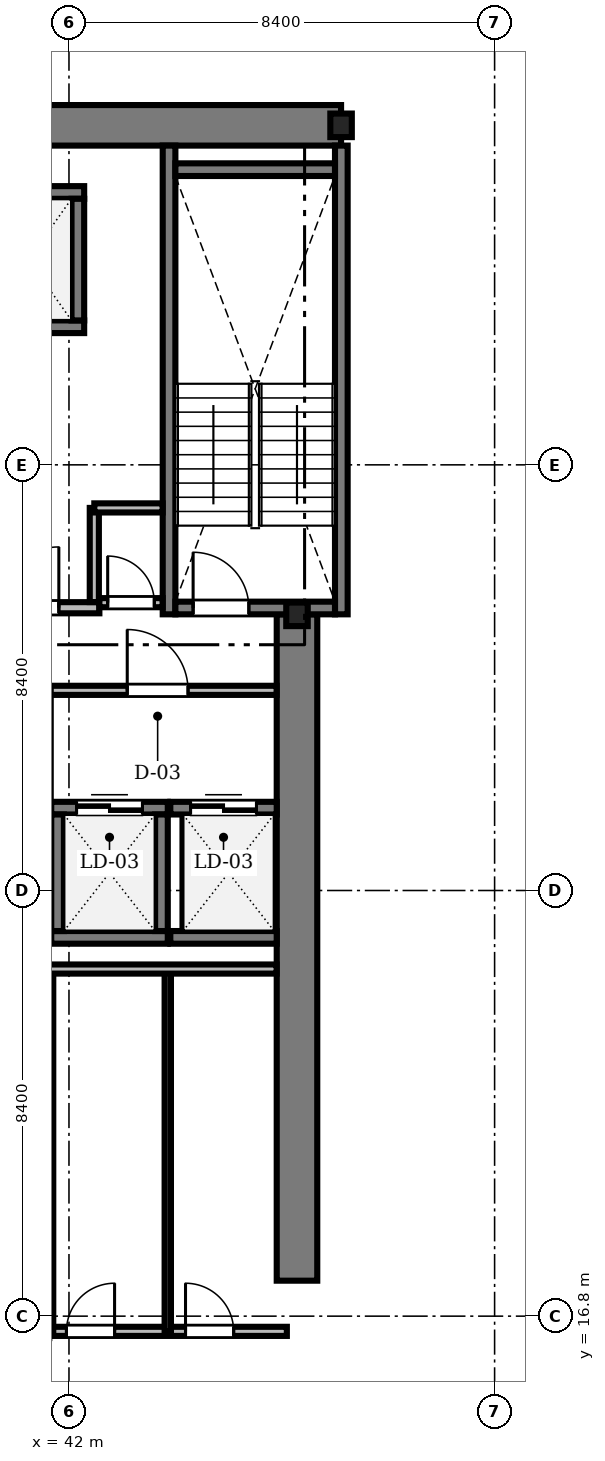
"""IFC4 building model, lengths in metres.
Left out: names, types, materials, properties, quantities, classifications, styles, units other than length and angle.
Written with IfcOpenShell. Run it as: python <this file> out.ifc"""

import sys

from ifc_helpers import new_model, si_unit, direction, frame, frame_2d, origin, origin_2d, place, context, subcontext, project, spatial, rectangle, i_section, extrude, source, transform, mapped, element, fill, save


model = new_model("IFC4")
c1 = context("Model", 3, precision=1e-05, world=origin(), true_north=direction((0.0, 1.0)))
c2 = subcontext(c1, "Body", "Model", "MODEL_VIEW")
j1 = project(units=[si_unit("LENGTHUNIT", "METRE"), si_unit("PLANEANGLEUNIT", "RADIAN")], contexts=[c1])
p1 = place(None, origin())
s1 = spatial("IfcSite", under=j1, at=p1, CompositionType="ELEMENT")
p2 = place(p1, origin())
s2 = spatial("IfcBuilding", under=s1, at=p2, CompositionType="ELEMENT")
p3 = place(p2, frame((0.0, 0.0, 115.0)))
s3 = spatial("IfcBuildingStorey", under=s2, at=p3, CompositionType="ELEMENT", Elevation=115.0)
m1 = source(origin(), c2, "Body", "SweptSolid", [
    extrude(rectangle(XDim=17.52, YDim=0.8, at=frame_2d((8.76, 0.0))), origin(), (0.0, 0.0, 1.0), 3.46),
])
p4 = place(p3, frame((29.85, 40.3, 0.0), z_axis=(0.0, 0.0, 1.0), x_axis=(1.0, 0.0, 0.0)))
e1 = element("IfcWall", 1, at=p4, inside=s3, PredefinedType="SHEAR", context=c2, shape_type="MappedRepresentation", body=[
    mapped(m1, transform((0.0, 0.0, 0.0), scale=1.0)),
])
m2 = source(origin(), c2, "Body", "SweptSolid", [
    extrude(rectangle(XDim=13.15, YDim=0.8, at=frame_2d((6.575, 0.0))), origin(), (0.0, 0.0, 1.0), 3.46),
])
p5 = place(p3, frame((46.5, 17.5, 0.0), z_axis=(0.0, 0.0, 1.0), x_axis=(0.0, 1.0, 0.0)))
e2 = element("IfcWall", 2, at=p5, inside=s3, PredefinedType="SHEAR", context=c2, shape_type="MappedRepresentation", body=[
    mapped(m2, transform((0.0, 0.0, 0.0), scale=1.0)),
])
m3 = source(origin(), c2, "Body", "SweptSolid", [
    extrude(i_section(OverallWidth=0.424, OverallDepth=0.465, WebThickness=0.035, FlangeThickness=0.056, FilletRadius=0.015, at=origin_2d()), origin(), (0.0, 0.0, 1.0), 3.46),
])
for number, where, z_axis, x_axis in (
    (3, (46.5, 30.65, 0.0), (0.0, 0.0, 1.0), (1.0, 0.0, 0.0)),
    (4, (47.37, 40.3, 0.0), (0.0, 0.0, 1.0), (1.0, 0.0, 0.0)),
):
    element("IfcColumn", number, at=place(p3, frame(where, z_axis=z_axis, x_axis=x_axis)), inside=s3, PredefinedType="COLUMN", context=c2, shape_type="MappedRepresentation", body=[
        mapped(m3, transform((0.0, 0.0, 0.0), scale=1.0)),
    ])
m4 = source(origin(), c2, "Body", "SweptSolid", [
    extrude(rectangle(XDim=9.25, YDim=0.25, at=frame_2d((4.625, 0.0))), origin(), (0.0, 0.0, 1.0), 3.5),
])
for number, where, z_axis, x_axis in (
    (5, (43.975, 30.65, 0.0), (0.0, 0.0, 1.0), (0.0, 1.0, 0.0)),
    (6, (47.375, 30.65, 0.0), (0.0, 0.0, 1.0), (0.0, 1.0, 0.0)),
):
    element("IfcWall", number, at=place(p3, frame(where, z_axis=z_axis, x_axis=x_axis)), inside=s3, PredefinedType="SOLIDWALL", context=c2, shape_type="MappedRepresentation", body=[
        mapped(m4, transform((0.0, 0.0, 0.0), scale=1.0)),
    ])
m5 = source(origin(), c2, "Body", "SweptSolid", [
    extrude(rectangle(XDim=3.15, YDim=0.25, at=frame_2d((1.575, 0.0))), origin(), (0.0, 0.0, 1.0), 3.5),
])
p6 = place(p3, frame((44.1, 39.425, 0.0), z_axis=(0.0, 0.0, 1.0), x_axis=(1.0, 0.0, 0.0)))
e7 = element("IfcWall", 7, at=p6, inside=s3, PredefinedType="SOLIDWALL", context=c2, shape_type="MappedRepresentation", body=[
    mapped(m5, transform((0.0, 0.0, 0.0), scale=1.0)),
])
p7 = place(p3, frame((44.1, 30.775, 0.0), z_axis=(0.0, 0.0, 1.0), x_axis=(1.0, 0.0, 0.0)))
e8 = element("IfcWall", 8, at=p7, inside=s3, PredefinedType="SOLIDWALL", context=c2, shape_type="MappedRepresentation", body=[
    mapped(m5, transform((0.0, 0.0, 0.0), scale=1.0)),
])
m6 = source(origin(), c2, "Body", "SweptSolid", [
    extrude(rectangle(XDim=1.1, YDim=2.2, at=frame_2d((0.55, 1.1))), frame((0.0, 0.135, 0.0), z_axis=(0.0, -1.0, 0.0), x_axis=(1.0, 0.0, 0.0)), (0.0, 0.0, 1.0), 0.27),
])
p8 = place(p7, frame((0.35, 0.0, 0.0)))
e9 = element("IfcOpeningElement", 9, at=p8, cuts=e8, PredefinedType="OPENING", context=c2, shape_type="MappedRepresentation", body=[
    mapped(m6, transform((0.0, 0.0, 0.0), scale=1.0)),
])
m7 = source(origin(), c2, "Body", "SweptSolid", [
    extrude(rectangle(XDim=2.8, YDim=0.22, at=frame_2d((1.4, 0.0))), origin(), (0.0, 0.0, 1.0), 3.46),
])
p9 = place(p3, frame((39.8, 30.78, 0.0), z_axis=(0.0, 0.0, 1.0), x_axis=(1.0, 0.0, 0.0)))
e10 = element("IfcWall", 10, at=p9, inside=s3, PredefinedType="SOLIDWALL", context=c2, shape_type="MappedRepresentation", body=[
    mapped(m7, transform((0.0, 0.0, 0.0), scale=1.0)),
])
m8 = source(origin(), c2, "Body", "SweptSolid", [
    extrude(rectangle(XDim=1.2, YDim=2.2, at=frame_2d((0.6, 1.1))), frame((0.0, 0.12, 0.0), z_axis=(0.0, -1.0, 0.0), x_axis=(1.0, 0.0, 0.0)), (0.0, 0.0, 1.0), 0.24),
])
p10 = place(p9, frame((0.8, 0.0, 0.0)))
e11 = element("IfcOpeningElement", 11, at=p10, cuts=e10, PredefinedType="OPENING", context=c2, shape_type="MappedRepresentation", body=[
    mapped(m8, transform((0.0, 0.0, 0.0), scale=1.0)),
])
m9 = source(origin(), c2, "Body", "SweptSolid", [
    extrude(rectangle(XDim=2.55, YDim=0.25, at=frame_2d((1.275, 0.0))), origin(), (0.0, 0.0, 1.0), 3.46),
])
p11 = place(p3, frame((39.75, 36.325, 0.0), z_axis=(0.0, 0.0, 1.0), x_axis=(1.0, 0.0, 0.0)))
e12 = element("IfcWall", 12, at=p11, inside=s3, PredefinedType="SOLIDWALL", context=c2, shape_type="MappedRepresentation", body=[
    mapped(m9, transform((0.0, 0.0, 0.0), scale=1.0)),
])
m10 = source(origin(), c2, "Body", "SweptSolid", [
    extrude(rectangle(XDim=1.2, YDim=2.25, at=frame_2d((0.6, 1.125))), frame((0.0, 0.135, 0.0), z_axis=(0.0, -1.0, 0.0), x_axis=(1.0, 0.0, 0.0)), (0.0, 0.0, 1.0), 0.27),
])
p12 = place(p11, frame((0.675, 0.0, 0.0)))
e13 = element("IfcOpeningElement", 13, at=p12, cuts=e12, PredefinedType="OPENING", context=c2, shape_type="MappedRepresentation", body=[
    mapped(m10, transform((0.0, 0.0, 0.0), scale=1.0)),
])
p13 = place(p3, frame((39.75, 38.975, 0.0), z_axis=(0.0, 0.0, 1.0), x_axis=(1.0, 0.0, 0.0)))
e14 = element("IfcWall", 14, at=p13, inside=s3, PredefinedType="SOLIDWALL", context=c2, shape_type="MappedRepresentation", body=[
    mapped(m9, transform((0.0, 0.0, 0.0), scale=1.0)),
])
m11 = source(origin(), c2, "Body", "SweptSolid", [
    extrude(rectangle(XDim=2.4, YDim=0.25, at=frame_2d((1.2, 0.0))), origin(), (0.0, 0.0, 1.0), 3.46),
])
p14 = place(p3, frame((42.175, 36.45, 0.0), z_axis=(0.0, 0.0, 1.0), x_axis=(0.0, 1.0, 0.0)))
e15 = element("IfcWall", 15, at=p14, inside=s3, PredefinedType="SOLIDWALL", context=c2, shape_type="MappedRepresentation", body=[
    mapped(m11, transform((0.0, 0.0, 0.0), scale=1.0)),
])
m12 = source(origin(), c2, "Body", "SweptSolid", [
    extrude(rectangle(XDim=2.3, YDim=0.25, at=frame_2d((1.15, 0.0))), origin(), (0.0, 0.0, 1.0), 3.46),
])
p15 = place(p3, frame((41.65, 24.275, 0.0), z_axis=(0.0, 0.0, 1.0), x_axis=(1.0, 0.0, 0.0)))
e16 = element("IfcWall", 16, at=p15, inside=s3, PredefinedType="SOLIDWALL", context=c2, shape_type="MappedRepresentation", body=[
    mapped(m12, transform((0.0, 0.0, 0.0), scale=1.0)),
])
p16 = place(p3, frame((41.65, 26.825, 0.0), z_axis=(0.0, 0.0, 1.0), x_axis=(1.0, 0.0, 0.0)))
e17 = element("IfcWall", 17, at=p16, inside=s3, PredefinedType="SOLIDWALL", context=c2, shape_type="MappedRepresentation", body=[
    mapped(m12, transform((0.0, 0.0, 0.0), scale=1.0)),
])
m13 = source(origin(), c2, "Body", "SweptSolid", [
    extrude(rectangle(XDim=1.3, YDim=2.3, at=frame_2d((0.65, 1.15))), frame((0.0, 0.135, 0.0), z_axis=(0.0, -1.0, 0.0), x_axis=(1.0, 0.0, 0.0)), (0.0, 0.0, 1.0), 0.27),
])
p17 = place(p16, frame((0.5, 0.0, 0.0)))
e18 = element("IfcOpeningElement", 18, at=p17, cuts=e17, PredefinedType="OPENING", context=c2, shape_type="MappedRepresentation", body=[
    mapped(m13, transform((0.0, 0.0, 0.0), scale=1.0)),
])
for number, where, z_axis, x_axis in (
    (19, (41.775, 24.4, 0.0), (0.0, 0.0, 1.0), (0.0, 1.0, 0.0)),
    (20, (43.825, 24.4, 0.0), (0.0, 0.0, 1.0), (0.0, 1.0, 0.0)),
):
    element("IfcWall", number, at=place(p3, frame(where, z_axis=z_axis, x_axis=x_axis)), inside=s3, PredefinedType="SOLIDWALL", context=c2, shape_type="MappedRepresentation", body=[
        mapped(m12, transform((0.0, 0.0, 0.0), scale=1.0)),
    ])
m14 = source(origin(), c2, "Body", "SweptSolid", [
    extrude(rectangle(XDim=2.1, YDim=0.25, at=frame_2d((1.05, 0.0))), origin(), (0.0, 0.0, 1.0), 3.46),
])
p18 = place(p3, frame((44.0, 24.275, 0.0), z_axis=(0.0, 0.0, 1.0), x_axis=(1.0, 0.0, 0.0)))
e21 = element("IfcWall", 21, at=p18, inside=s3, PredefinedType="SOLIDWALL", context=c2, shape_type="MappedRepresentation", body=[
    mapped(m14, transform((0.0, 0.0, 0.0), scale=1.0)),
])
p19 = place(p3, frame((44.0, 26.825, 0.0), z_axis=(0.0, 0.0, 1.0), x_axis=(1.0, 0.0, 0.0)))
e22 = element("IfcWall", 22, at=p19, inside=s3, PredefinedType="SOLIDWALL", context=c2, shape_type="MappedRepresentation", body=[
    mapped(m14, transform((0.0, 0.0, 0.0), scale=1.0)),
])
p20 = place(p19, frame((0.4, 0.0, 0.0)))
e23 = element("IfcOpeningElement", 23, at=p20, cuts=e22, PredefinedType="OPENING", context=c2, shape_type="MappedRepresentation", body=[
    mapped(m13, transform((0.0, 0.0, 0.0), scale=1.0)),
])
m15 = source(origin(), c2, "Body", "SweptSolid", [
    extrude(rectangle(XDim=4.548, YDim=0.18, at=frame_2d((2.274, 0.0))), origin(), (0.0, 0.0, 1.0), 3.092),
])
p21 = place(p3, frame((41.55, 29.15, 0.0), z_axis=(0.0, 0.0, 1.0), x_axis=(1.0, 0.0, 0.0)))
e24 = element("IfcWall", 24, at=p21, inside=s3, PredefinedType="PARTITIONING", context=c2, shape_type="MappedRepresentation", body=[
    mapped(m15, transform((0.0, 0.0, 0.0), scale=1.0)),
])
m16 = source(origin(), c2, "Body", "SweptSolid", [
    extrude(rectangle(XDim=1.2, YDim=2.2, at=frame_2d((0.6, 1.1))), frame((0.0, 0.1, 0.0), z_axis=(0.0, -1.0, 0.0), x_axis=(1.0, 0.0, 0.0)), (0.0, 0.0, 1.0), 0.2),
])
p22 = place(p21, frame((1.6, 0.0, 0.0)))
e25 = element("IfcOpeningElement", 25, at=p22, cuts=e24, PredefinedType="OPENING", context=c2, shape_type="MappedRepresentation", body=[
    mapped(m16, transform((0.0, 0.0, 0.0), scale=1.0)),
])
m17 = source(origin(), c2, "Body", "SweptSolid", [
    extrude(rectangle(XDim=4.7, YDim=0.18, at=frame_2d((2.35, 0.0))), origin(), (0.0, 0.0, 1.0), 2.852),
])
p23 = place(p3, frame((41.6, 16.5, 0.0), z_axis=(0.0, 0.0, 1.0), x_axis=(1.0, 0.0, 0.0)))
e26 = element("IfcWall", 26, at=p23, inside=s3, PredefinedType="PARTITIONING", context=c2, shape_type="MappedRepresentation", body=[
    mapped(m17, transform((0.0, 0.0, 0.0), scale=1.0)),
])
m18 = source(origin(), c2, "Body", "SweptSolid", [
    extrude(rectangle(XDim=0.95, YDim=2.15, at=frame_2d((0.475, 1.075))), frame((0.0, 0.1, 0.0), z_axis=(0.0, -1.0, 0.0), x_axis=(1.0, 0.0, 0.0)), (0.0, 0.0, 1.0), 0.2),
])
p24 = place(p23, frame((0.35, 0.0, 0.0)))
e27 = element("IfcOpeningElement", 27, at=p24, cuts=e26, PredefinedType="OPENING", context=c2, shape_type="MappedRepresentation", body=[
    mapped(m18, transform((0.0, 0.0, 0.0), scale=1.0)),
])
p25 = place(p23, frame((2.7, 0.0, 0.0)))
e28 = element("IfcOpeningElement", 28, at=p25, cuts=e26, PredefinedType="OPENING", context=c2, shape_type="MappedRepresentation", body=[
    mapped(m18, transform((0.0, 0.0, 0.0), scale=1.0)),
])
m19 = source(origin(), c2, "Body", "SweptSolid", [
    extrude(rectangle(XDim=1.248, YDim=0.18, at=frame_2d((0.624, 0.0))), origin(), (0.0, 0.0, 1.0), 3.46),
])
p26 = place(p3, frame((42.6, 30.88, 0.0), z_axis=(0.0, 0.0, 1.0), x_axis=(1.0, 0.0, 0.0)))
e29 = element("IfcWall", 29, at=p26, inside=s3, PredefinedType="PARTITIONING", context=c2, shape_type="MappedRepresentation", body=[
    mapped(m19, transform((0.0, 0.0, 0.0), scale=1.0)),
])
m20 = source(origin(), c2, "Body", "SweptSolid", [
    extrude(rectangle(XDim=0.92, YDim=2.1, at=frame_2d((0.46, 1.05))), frame((0.0, 0.1, 0.0), z_axis=(0.0, -1.0, 0.0), x_axis=(1.0, 0.0, 0.0)), (0.0, 0.0, 1.0), 0.2),
])
p27 = place(p26, frame((0.164, 0.0, 0.0)))
e30 = element("IfcOpeningElement", 30, at=p27, cuts=e29, PredefinedType="OPENING", context=c2, shape_type="MappedRepresentation", body=[
    mapped(m20, transform((0.0, 0.0, 0.0), scale=1.0)),
])
m21 = source(origin(), c2, "Body", "SweptSolid", [
    extrude(rectangle(XDim=7.15, YDim=0.18, at=frame_2d((3.575, 0.0))), origin(), (0.0, 0.0, 1.0), 2.852),
])
p28 = place(p3, frame((41.6, 16.5, 0.0), z_axis=(0.0, 0.0, 1.0), x_axis=(0.0, 1.0, 0.0)))
e31 = element("IfcWall", 31, at=p28, inside=s3, PredefinedType="PARTITIONING", context=c2, shape_type="MappedRepresentation", body=[
    mapped(m21, transform((0.0, 0.0, 0.0), scale=1.0)),
])
m22 = source(origin(), c2, "Body", "SweptSolid", [
    extrude(rectangle(XDim=7.15, YDim=0.125, at=frame_2d((3.575, 0.0))), origin(), (0.0, 0.0, 1.0), 2.852),
])
p29 = place(p3, frame((43.95, 16.5, 0.0), z_axis=(0.0, 0.0, 1.0), x_axis=(0.0, 1.0, 0.0)))
e32 = element("IfcWall", 32, at=p29, inside=s3, PredefinedType="PARTITIONING", context=c2, shape_type="MappedRepresentation", body=[
    mapped(m22, transform((0.0, 0.0, 0.0), scale=1.0)),
])
m23 = source(origin(), c2, "Body", "SweptSolid", [
    extrude(rectangle(XDim=4.498, YDim=0.18, at=frame_2d((2.249, 0.0))), origin(), (0.0, 0.0, 1.0), 3.46),
])
p30 = place(p3, frame((41.6, 23.65, 0.0), z_axis=(0.0, 0.0, 1.0), x_axis=(1.0, 0.0, 0.0)))
e33 = element("IfcWall", 33, at=p30, inside=s3, PredefinedType="PARTITIONING", context=c2, shape_type="MappedRepresentation", body=[
    mapped(m23, transform((0.0, 0.0, 0.0), scale=1.0)),
])
m24 = source(origin(), c2, "Body", "SweptSolid", [
    extrude(rectangle(XDim=1.858, YDim=0.18, at=frame_2d((0.929, 0.0))), origin(), (0.0, 0.0, 1.0), 3.46),
])
p31 = place(p3, frame((42.5, 30.892, 0.0), z_axis=(0.0, 0.0, 1.0), x_axis=(0.0, 1.0, 0.0)))
e34 = element("IfcWall", 34, at=p31, inside=s3, PredefinedType="PARTITIONING", context=c2, shape_type="MappedRepresentation", body=[
    mapped(m24, transform((0.0, 0.0, 0.0), scale=1.0)),
])
m25 = source(origin(), c2, "Body", "SweptSolid", [
    extrude(rectangle(XDim=1.348, YDim=0.18, at=frame_2d((0.674, 0.0))), origin(), (0.0, 0.0, 1.0), 3.46),
])
p32 = place(p3, frame((42.5, 32.75, 0.0), z_axis=(0.0, 0.0, 1.0), x_axis=(1.0, 0.0, 0.0)))
e35 = element("IfcWall", 35, at=p32, inside=s3, PredefinedType="PARTITIONING", context=c2, shape_type="MappedRepresentation", body=[
    mapped(m25, transform((0.0, 0.0, 0.0), scale=1.0)),
])
m26 = source(origin(), c2, "Body", "SweptSolid", [
    extrude(rectangle(XDim=1.1, YDim=2.2, at=frame_2d((0.55, 1.1))), frame((0.0, 0.025, 0.0), z_axis=(0.0, -1.0, 0.0), x_axis=(1.0, 0.0, 0.0)), (0.0, 0.0, 1.0), 0.05),
])
p33 = place(p8, origin())
e36 = element("IfcDoor", 36, at=p33, inside=s3, OperationType="SINGLE_SWING_LEFT", PredefinedType="DOOR", context=c2, shape_type="MappedRepresentation", body=[
    mapped(m26, transform((0.0, 0.0, 0.0), scale=1.0)),
])
fill(e9, e36)
m27 = source(origin(), c2, "Body", "SweptSolid", [
    extrude(rectangle(XDim=1.2, YDim=2.2, at=frame_2d((0.6, 1.1))), frame((0.0, 0.025, 0.0), z_axis=(0.0, -1.0, 0.0), x_axis=(1.0, 0.0, 0.0)), (0.0, 0.0, 1.0), 0.05),
])
p34 = place(p10, origin())
e37 = element("IfcDoor", 37, at=p34, inside=s3, OperationType="SINGLE_SWING_RIGHT", PredefinedType="DOOR", context=c2, shape_type="MappedRepresentation", body=[
    mapped(m27, transform((0.0, 0.0, 0.0), scale=1.0)),
])
fill(e11, e37)
m28 = source(origin(), c2, "Body", "SweptSolid", [
    extrude(rectangle(XDim=1.3, YDim=2.3, at=frame_2d((0.65, 1.15))), frame((0.0, 0.025, 0.0), z_axis=(0.0, -1.0, 0.0), x_axis=(1.0, 0.0, 0.0)), (0.0, 0.0, 1.0), 0.05),
])
p35 = place(p17, origin())
e38 = element("IfcDoor", 38, at=p35, inside=s3, OperationType="DOUBLE_DOOR_SLIDING", PredefinedType="DOOR", context=c2, shape_type="MappedRepresentation", body=[
    mapped(m28, transform((0.0, 0.0, 0.0), scale=1.0)),
])
fill(e18, e38)
p36 = place(p20, origin())
e39 = element("IfcDoor", 39, at=p36, inside=s3, OperationType="DOUBLE_DOOR_SLIDING", PredefinedType="DOOR", context=c2, shape_type="MappedRepresentation", body=[
    mapped(m28, transform((0.0, 0.0, 0.0), scale=1.0)),
])
fill(e23, e39)
p37 = place(p22, origin())
e40 = element("IfcDoor", 40, at=p37, inside=s3, OperationType="SINGLE_SWING_LEFT", PredefinedType="DOOR", context=c2, shape_type="MappedRepresentation", body=[
    mapped(m27, transform((0.0, 0.0, 0.0), scale=1.0)),
])
fill(e25, e40)
m29 = source(origin(), c2, "Body", "SweptSolid", [
    extrude(rectangle(XDim=0.95, YDim=2.15, at=frame_2d((0.475, 1.075))), frame((0.0, 0.025, 0.0), z_axis=(0.0, -1.0, 0.0), x_axis=(1.0, 0.0, 0.0)), (0.0, 0.0, 1.0), 0.05),
])
p38 = place(p24, origin())
e41 = element("IfcDoor", 41, at=p38, inside=s3, OperationType="SINGLE_SWING_RIGHT", PredefinedType="DOOR", context=c2, shape_type="MappedRepresentation", body=[
    mapped(m29, transform((0.0, 0.0, 0.0), scale=1.0)),
])
fill(e27, e41)
p39 = place(p25, origin())
e42 = element("IfcDoor", 42, at=p39, inside=s3, OperationType="SINGLE_SWING_LEFT", PredefinedType="DOOR", context=c2, shape_type="MappedRepresentation", body=[
    mapped(m29, transform((0.0, 0.0, 0.0), scale=1.0)),
])
fill(e28, e42)
m30 = source(origin(), c2, "Body", "SweptSolid", [
    extrude(rectangle(XDim=0.92, YDim=2.1, at=frame_2d((0.46, 1.05))), frame((0.0, 0.025, 0.0), z_axis=(0.0, -1.0, 0.0), x_axis=(1.0, 0.0, 0.0)), (0.0, 0.0, 1.0), 0.05),
])
p40 = place(p27, origin())
e43 = element("IfcDoor", 43, at=p40, inside=s3, OperationType="SINGLE_SWING_LEFT", PredefinedType="DOOR", context=c2, shape_type="MappedRepresentation", body=[
    mapped(m30, transform((0.0, 0.0, 0.0), scale=1.0)),
])
fill(e30, e43)
save(model, sys.argv[1])
